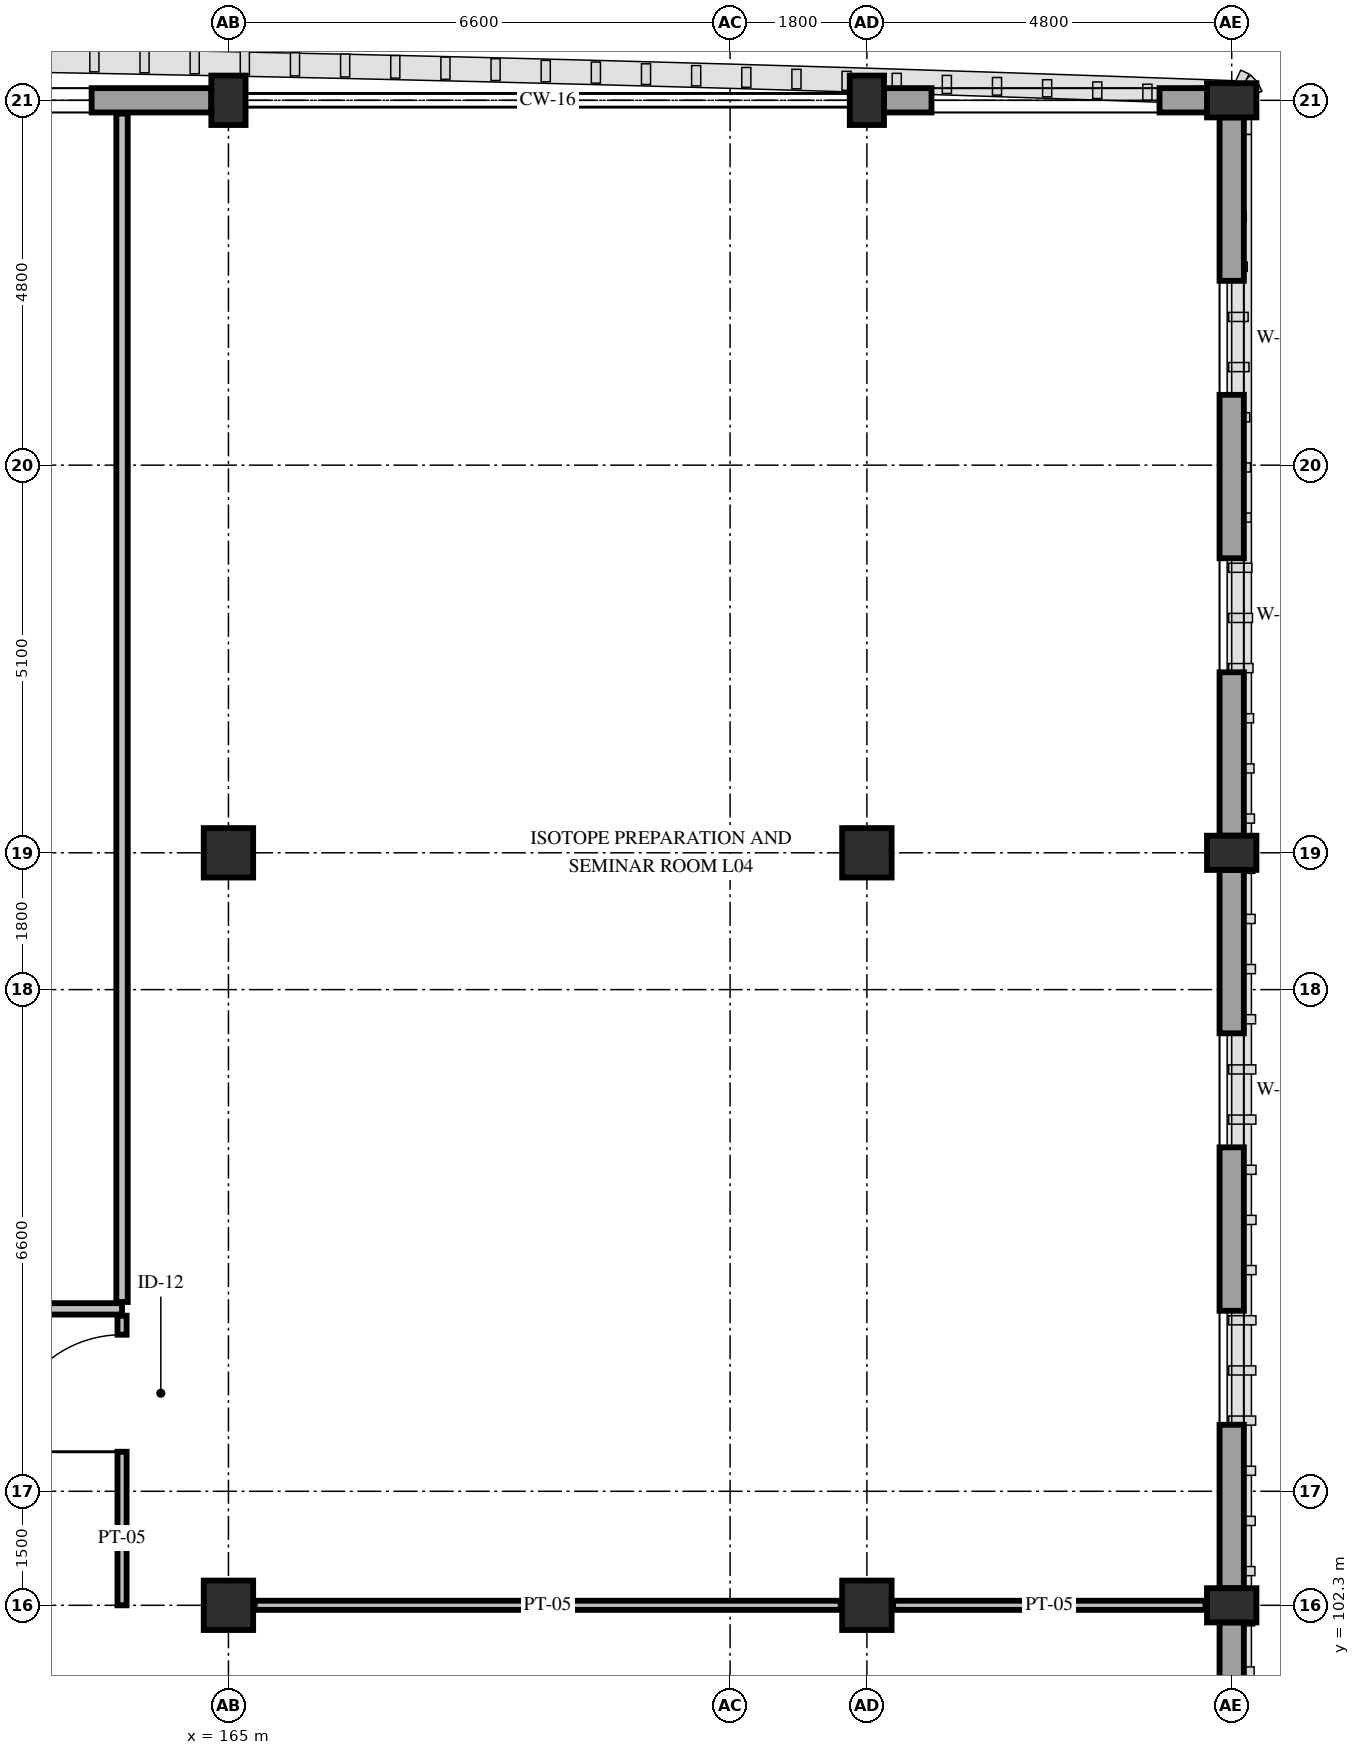
"""IFC4 building model, lengths in metres.
Left out: names, types, materials, properties, quantities, classifications, styles, units other than length and angle.
Written with IfcOpenShell. Run it as: python <this file> out.ifc"""

import sys

from ifc_helpers import new_model, si_unit, direction, frame, frame_2d, origin, origin_2d, place, context, subcontext, project, spatial, rectangle, extrude, element, fill, save


model = new_model("IFC4")
c1 = context("Model", 3, precision=1e-05, world=origin(), true_north=direction((0.0, 1.0)))
c2 = subcontext(c1, "Body", "Model", "MODEL_VIEW")
j1 = project(units=[si_unit("LENGTHUNIT", "METRE"), si_unit("PLANEANGLEUNIT", "RADIAN")], contexts=[c1])
p1 = place(None, origin())
s1 = spatial("IfcSite", under=j1, at=p1, CompositionType="ELEMENT")
p2 = place(p1, origin())
s2 = spatial("IfcBuilding", under=s1, at=p2, CompositionType="ELEMENT")
p3 = place(p2, frame((0.0, 0.0, 19.8)))
s3 = spatial("IfcBuildingStorey", under=s2, at=p3, CompositionType="ELEMENT", Elevation=19.8)
for number, where, z_axis, x_axis in (
    (1, (165.0, 102.3, 0.0), (0.0, 0.0, 1.0), (1.0, 0.0, 0.0)),
    (2, (165.0, 112.2, 0.0), (0.0, 0.0, 1.0), (1.0, 0.0, 0.0)),
):
    element("IfcColumn", number, at=place(p3, frame(where, z_axis=z_axis, x_axis=x_axis)), inside=s3, PredefinedType="COLUMN", context=c2, shape_type="SweptSolid", body=[
        extrude(rectangle(XDim=0.65, YDim=0.65, at=origin_2d()), origin(), (0.0, 0.0, 1.0), 4.8),
    ])
p4 = place(p3, frame((165.0, 122.1, 0.0), z_axis=(0.0, 0.0, 1.0), x_axis=(1.0, 0.0, 0.0)))
e3 = element("IfcColumn", 3, at=p4, inside=s3, PredefinedType="PILASTER", context=c2, shape_type="SweptSolid", body=[
    extrude(rectangle(XDim=0.45, YDim=0.65, at=origin_2d()), origin(), (0.0, 0.0, 1.0), 4.8),
])
for number, where, z_axis, x_axis in (
    (4, (173.4, 102.3, 0.0), (0.0, 0.0, 1.0), (1.0, 0.0, 0.0)),
    (5, (173.4, 112.2, 0.0), (0.0, 0.0, 1.0), (1.0, 0.0, 0.0)),
):
    element("IfcColumn", number, at=place(p3, frame(where, z_axis=z_axis, x_axis=x_axis)), inside=s3, PredefinedType="COLUMN", context=c2, shape_type="SweptSolid", body=[
        extrude(rectangle(XDim=0.65, YDim=0.65, at=origin_2d()), origin(), (0.0, 0.0, 1.0), 4.8),
    ])
for number, where, z_axis, x_axis in (
    (6, (173.4, 122.1, 0.0), (0.0, 0.0, 1.0), (1.0, 0.0, 0.0)),
    (7, (178.2, 102.3, 0.0), (0.0, 0.0, 1.0), (0.0, 1.0, 0.0)),
    (8, (178.2, 112.2, 0.0), (0.0, 0.0, 1.0), (0.0, 1.0, 0.0)),
    (9, (178.2, 122.1, 0.0), (0.0, 0.0, 1.0), (0.0, 1.0, 0.0)),
):
    element("IfcColumn", number, at=place(p3, frame(where, z_axis=z_axis, x_axis=x_axis)), inside=s3, PredefinedType="PILASTER", context=c2, shape_type="SweptSolid", body=[
        extrude(rectangle(XDim=0.45, YDim=0.65, at=origin_2d()), origin(), (0.0, 0.0, 1.0), 4.8),
    ])
p5 = place(p3, frame((158.625, 122.1, 0.0), z_axis=(0.0, 0.0, 1.0), x_axis=(1.0, 0.0, 0.0)))
e10 = element("IfcWall", 10, at=p5, inside=s3, PredefinedType="STANDARD", context=c2, shape_type="SweptSolid", body=[
    extrude(rectangle(XDim=6.15, YDim=0.32, at=frame_2d((3.075, 0.0))), origin(), (0.0, 0.0, 1.0), 3.78),
])
p6 = place(p5, frame((1.575, 0.0, 0.85)))
e11 = element("IfcOpeningElement", 11, at=p6, cuts=e10, PredefinedType="OPENING", context=c2, shape_type="SweptSolid", body=[
    extrude(rectangle(XDim=3.0, YDim=1.88, at=frame_2d((1.5, 0.94))), frame((0.0, 0.175, 0.0), z_axis=(0.0, -1.0, 0.0), x_axis=(1.0, 0.0, 0.0)), (0.0, 0.0, 1.0), 0.35),
])
p7 = place(p3, frame((173.625, 122.1, 0.0), z_axis=(0.0, 0.0, 1.0), x_axis=(1.0, 0.0, 0.0)))
e12 = element("IfcWall", 12, at=p7, inside=s3, PredefinedType="STANDARD", context=c2, shape_type="SweptSolid", body=[
    extrude(rectangle(XDim=4.25, YDim=0.32, at=frame_2d((2.125, 0.0))), origin(), (0.0, 0.0, 1.0), 3.95),
])
p8 = place(p7, frame((0.625, 0.0, 0.85)))
e13 = element("IfcOpeningElement", 13, at=p8, cuts=e12, PredefinedType="OPENING", context=c2, shape_type="SweptSolid", body=[
    extrude(rectangle(XDim=3.0, YDim=1.88, at=frame_2d((1.5, 0.94))), frame((0.0, 0.175, 0.0), z_axis=(0.0, -1.0, 0.0), x_axis=(1.0, 0.0, 0.0)), (0.0, 0.0, 1.0), 0.35),
])
p9 = place(p3, frame((178.2, 121.875, 0.0), z_axis=(0.0, 0.0, 1.0), x_axis=(0.0, -1.0, 0.0)))
e14 = element("IfcWall", 14, at=p9, inside=s3, PredefinedType="STANDARD", context=c2, shape_type="SweptSolid", body=[
    extrude(rectangle(XDim=9.45, YDim=0.32, at=frame_2d((4.725, 0.0))), origin(), (0.0, 0.0, 1.0), 3.95),
])
p10 = place(p9, frame((2.15, 0.0, 0.85)))
e15 = element("IfcOpeningElement", 15, at=p10, cuts=e14, PredefinedType="OPENING", context=c2, shape_type="SweptSolid", body=[
    extrude(rectangle(XDim=1.5, YDim=2.08, at=frame_2d((0.75, 1.04))), frame((0.0, 0.175, 0.0), z_axis=(0.0, -1.0, 0.0), x_axis=(1.0, 0.0, 0.0)), (0.0, 0.0, 1.0), 0.35),
])
p11 = place(p9, frame((5.8, 0.0, 0.85)))
e16 = element("IfcOpeningElement", 16, at=p11, cuts=e14, PredefinedType="OPENING", context=c2, shape_type="SweptSolid", body=[
    extrude(rectangle(XDim=1.5, YDim=2.08, at=frame_2d((0.75, 1.04))), frame((0.0, 0.175, 0.0), z_axis=(0.0, -1.0, 0.0), x_axis=(1.0, 0.0, 0.0)), (0.0, 0.0, 1.0), 0.35),
])
p12 = place(p3, frame((178.2, 111.975, 0.0), z_axis=(0.0, 0.0, 1.0), x_axis=(0.0, -1.0, 0.0)))
e17 = element("IfcWall", 17, at=p12, inside=s3, PredefinedType="STANDARD", context=c2, shape_type="SweptSolid", body=[
    extrude(rectangle(XDim=9.45, YDim=0.32, at=frame_2d((4.725, 0.0))), origin(), (0.0, 0.0, 1.0), 3.95),
])
p13 = place(p12, frame((2.15, 0.0, 0.85)))
e18 = element("IfcOpeningElement", 18, at=p13, cuts=e17, PredefinedType="OPENING", context=c2, shape_type="SweptSolid", body=[
    extrude(rectangle(XDim=1.5, YDim=2.08, at=frame_2d((0.75, 1.04))), frame((0.0, 0.175, 0.0), z_axis=(0.0, -1.0, 0.0), x_axis=(1.0, 0.0, 0.0)), (0.0, 0.0, 1.0), 0.35),
])
p14 = place(p12, frame((5.8, 0.0, 0.85)))
e19 = element("IfcOpeningElement", 19, at=p14, cuts=e17, PredefinedType="OPENING", context=c2, shape_type="SweptSolid", body=[
    extrude(rectangle(XDim=1.5, YDim=2.08, at=frame_2d((0.75, 1.04))), frame((0.0, 0.175, 0.0), z_axis=(0.0, -1.0, 0.0), x_axis=(1.0, 0.0, 0.0)), (0.0, 0.0, 1.0), 0.35),
])
p15 = place(p3, frame((178.2, 102.075, 0.0), z_axis=(0.0, 0.0, 1.0), x_axis=(0.0, -1.0, 0.0)))
e20 = element("IfcWall", 20, at=p15, inside=s3, PredefinedType="STANDARD", context=c2, shape_type="SweptSolid", body=[
    extrude(rectangle(XDim=9.45, YDim=0.32, at=frame_2d((4.725, 0.0))), origin(), (0.0, 0.0, 1.0), 3.95),
])
p16 = place(p15, frame((2.15, 0.0, 0.85)))
e21 = element("IfcOpeningElement", 21, at=p16, cuts=e20, PredefinedType="OPENING", context=c2, shape_type="SweptSolid", body=[
    extrude(rectangle(XDim=1.5, YDim=2.08, at=frame_2d((0.75, 1.04))), frame((0.0, 0.175, 0.0), z_axis=(0.0, -1.0, 0.0), x_axis=(1.0, 0.0, 0.0)), (0.0, 0.0, 1.0), 0.35),
])
p17 = place(p15, frame((5.8, 0.0, 0.85)))
e22 = element("IfcOpeningElement", 22, at=p17, cuts=e20, PredefinedType="OPENING", context=c2, shape_type="SweptSolid", body=[
    extrude(rectangle(XDim=1.5, YDim=2.08, at=frame_2d((0.75, 1.04))), frame((0.0, 0.175, 0.0), z_axis=(0.0, -1.0, 0.0), x_axis=(1.0, 0.0, 0.0)), (0.0, 0.0, 1.0), 0.35),
])
p18 = place(p3, frame((137.29, 106.2, 0.0), z_axis=(0.0, 0.0, 1.0), x_axis=(1.0, 0.0, 0.0)))
e23 = element("IfcWall", 23, at=p18, inside=s3, PredefinedType="PARTITIONING", context=c2, shape_type="SweptSolid", body=[
    extrude(rectangle(XDim=26.31, YDim=0.15, at=frame_2d((13.155, 0.0))), origin(), (0.0, 0.0, 1.0), 3.78),
])
p19 = place(p18, frame((12.36, 0.0, 0.0)))
e24 = element("IfcOpeningElement", 24, at=p19, cuts=e23, PredefinedType="OPENING", context=c2, shape_type="SweptSolid", body=[
    extrude(rectangle(XDim=1.5, YDim=2.25, at=frame_2d((0.75, 1.125))), frame((0.0, 0.09, 0.0), z_axis=(0.0, -1.0, 0.0), x_axis=(1.0, 0.0, 0.0)), (0.0, 0.0, 1.0), 0.18),
])
p20 = place(p3, frame((163.6, 106.29, 0.0), z_axis=(0.0, 0.0, 1.0), x_axis=(0.0, 1.0, 0.0)))
e25 = element("IfcWall", 25, at=p20, inside=s3, PredefinedType="PARTITIONING", context=c2, shape_type="SweptSolid", body=[
    extrude(rectangle(XDim=15.635, YDim=0.15, at=frame_2d((7.817, 0.0))), origin(), (0.0, 0.0, 1.0), 3.93),
])
p21 = place(p3, frame((165.345, 102.3, 0.0), z_axis=(0.0, 0.0, 1.0), x_axis=(1.0, 0.0, 0.0)))
e26 = element("IfcWall", 26, at=p21, inside=s3, PredefinedType="PARTITIONING", context=c2, shape_type="SweptSolid", body=[
    extrude(rectangle(XDim=7.71, YDim=0.12, at=frame_2d((3.855, 0.0))), origin(), (0.0, 0.0, 1.0), 3.83),
])
p22 = place(p3, frame((173.745, 102.3, 0.0), z_axis=(0.0, 0.0, 1.0), x_axis=(1.0, 0.0, 0.0)))
e27 = element("IfcWall", 27, at=p22, inside=s3, PredefinedType="PARTITIONING", context=c2, shape_type="SweptSolid", body=[
    extrude(rectangle(XDim=4.11, YDim=0.12, at=frame_2d((2.055, 0.0))), origin(), (0.0, 0.0, 1.0), 4.46),
])
p23 = place(p3, frame((163.6, 102.3, 0.0), z_axis=(0.0, 0.0, 1.0), x_axis=(0.0, 1.0, 0.0)))
e28 = element("IfcWall", 28, at=p23, inside=s3, PredefinedType="PARTITIONING", context=c2, shape_type="SweptSolid", body=[
    extrude(rectangle(XDim=3.81, YDim=0.12, at=frame_2d((1.905, 0.0))), origin(), (0.0, 0.0, 1.0), 4.065),
])
p24 = place(p23, frame((2.02, 0.0, 0.0)))
e29 = element("IfcOpeningElement", 29, at=p24, cuts=e28, PredefinedType="OPENING", context=c2, shape_type="SweptSolid", body=[
    extrude(rectangle(XDim=1.54, YDim=2.25, at=frame_2d((0.77, 1.125))), frame((0.0, 0.075, 0.0), z_axis=(0.0, -1.0, 0.0), x_axis=(1.0, 0.0, 0.0)), (0.0, 0.0, 1.0), 0.15),
])
p25 = place(p6, origin())
e30 = element("IfcWindow", 30, at=p25, inside=s3, PartitioningType="DOUBLE_PANEL_VERTICAL", PredefinedType="WINDOW", context=c2, shape_type="SweptSolid", body=[
    extrude(rectangle(XDim=3.0, YDim=1.88, at=frame_2d((1.5, 0.94))), frame((0.0, 0.03, 0.0), z_axis=(0.0, -1.0, 0.0), x_axis=(1.0, 0.0, 0.0)), (0.0, 0.0, 1.0), 0.06),
])
fill(e11, e30)
p26 = place(p8, origin())
e31 = element("IfcWindow", 31, at=p26, inside=s3, PartitioningType="DOUBLE_PANEL_VERTICAL", PredefinedType="WINDOW", context=c2, shape_type="SweptSolid", body=[
    extrude(rectangle(XDim=3.0, YDim=1.88, at=frame_2d((1.5, 0.94))), frame((0.0, 0.03, 0.0), z_axis=(0.0, -1.0, 0.0), x_axis=(1.0, 0.0, 0.0)), (0.0, 0.0, 1.0), 0.06),
])
fill(e13, e31)
p27 = place(p10, origin())
e32 = element("IfcWindow", 32, at=p27, inside=s3, PartitioningType="SINGLE_PANEL", PredefinedType="WINDOW", context=c2, shape_type="SweptSolid", body=[
    extrude(rectangle(XDim=1.5, YDim=2.08, at=frame_2d((0.75, 1.04))), frame((0.0, 0.03, 0.0), z_axis=(0.0, -1.0, 0.0), x_axis=(1.0, 0.0, 0.0)), (0.0, 0.0, 1.0), 0.06),
])
fill(e15, e32)
p28 = place(p11, origin())
e33 = element("IfcWindow", 33, at=p28, inside=s3, PartitioningType="SINGLE_PANEL", PredefinedType="WINDOW", context=c2, shape_type="SweptSolid", body=[
    extrude(rectangle(XDim=1.5, YDim=2.08, at=frame_2d((0.75, 1.04))), frame((0.0, 0.03, 0.0), z_axis=(0.0, -1.0, 0.0), x_axis=(1.0, 0.0, 0.0)), (0.0, 0.0, 1.0), 0.06),
])
fill(e16, e33)
p29 = place(p13, origin())
e34 = element("IfcWindow", 34, at=p29, inside=s3, PartitioningType="SINGLE_PANEL", PredefinedType="WINDOW", context=c2, shape_type="SweptSolid", body=[
    extrude(rectangle(XDim=1.5, YDim=2.08, at=frame_2d((0.75, 1.04))), frame((0.0, 0.03, 0.0), z_axis=(0.0, -1.0, 0.0), x_axis=(1.0, 0.0, 0.0)), (0.0, 0.0, 1.0), 0.06),
])
fill(e18, e34)
p30 = place(p14, origin())
e35 = element("IfcWindow", 35, at=p30, inside=s3, PartitioningType="SINGLE_PANEL", PredefinedType="WINDOW", context=c2, shape_type="SweptSolid", body=[
    extrude(rectangle(XDim=1.5, YDim=2.08, at=frame_2d((0.75, 1.04))), frame((0.0, 0.03, 0.0), z_axis=(0.0, -1.0, 0.0), x_axis=(1.0, 0.0, 0.0)), (0.0, 0.0, 1.0), 0.06),
])
fill(e19, e35)
p31 = place(p24, origin())
e36 = element("IfcDoor", 36, at=p31, inside=s3, OperationType="SINGLE_SWING_LEFT", PredefinedType="DOOR", context=c2, shape_type="SweptSolid", body=[
    extrude(rectangle(XDim=1.54, YDim=2.25, at=frame_2d((0.77, 1.125))), frame((0.0, 0.025, 0.0), z_axis=(0.0, -1.0, 0.0), x_axis=(1.0, 0.0, 0.0)), (0.0, 0.0, 1.0), 0.05),
])
fill(e29, e36)
save(model, sys.argv[1])
